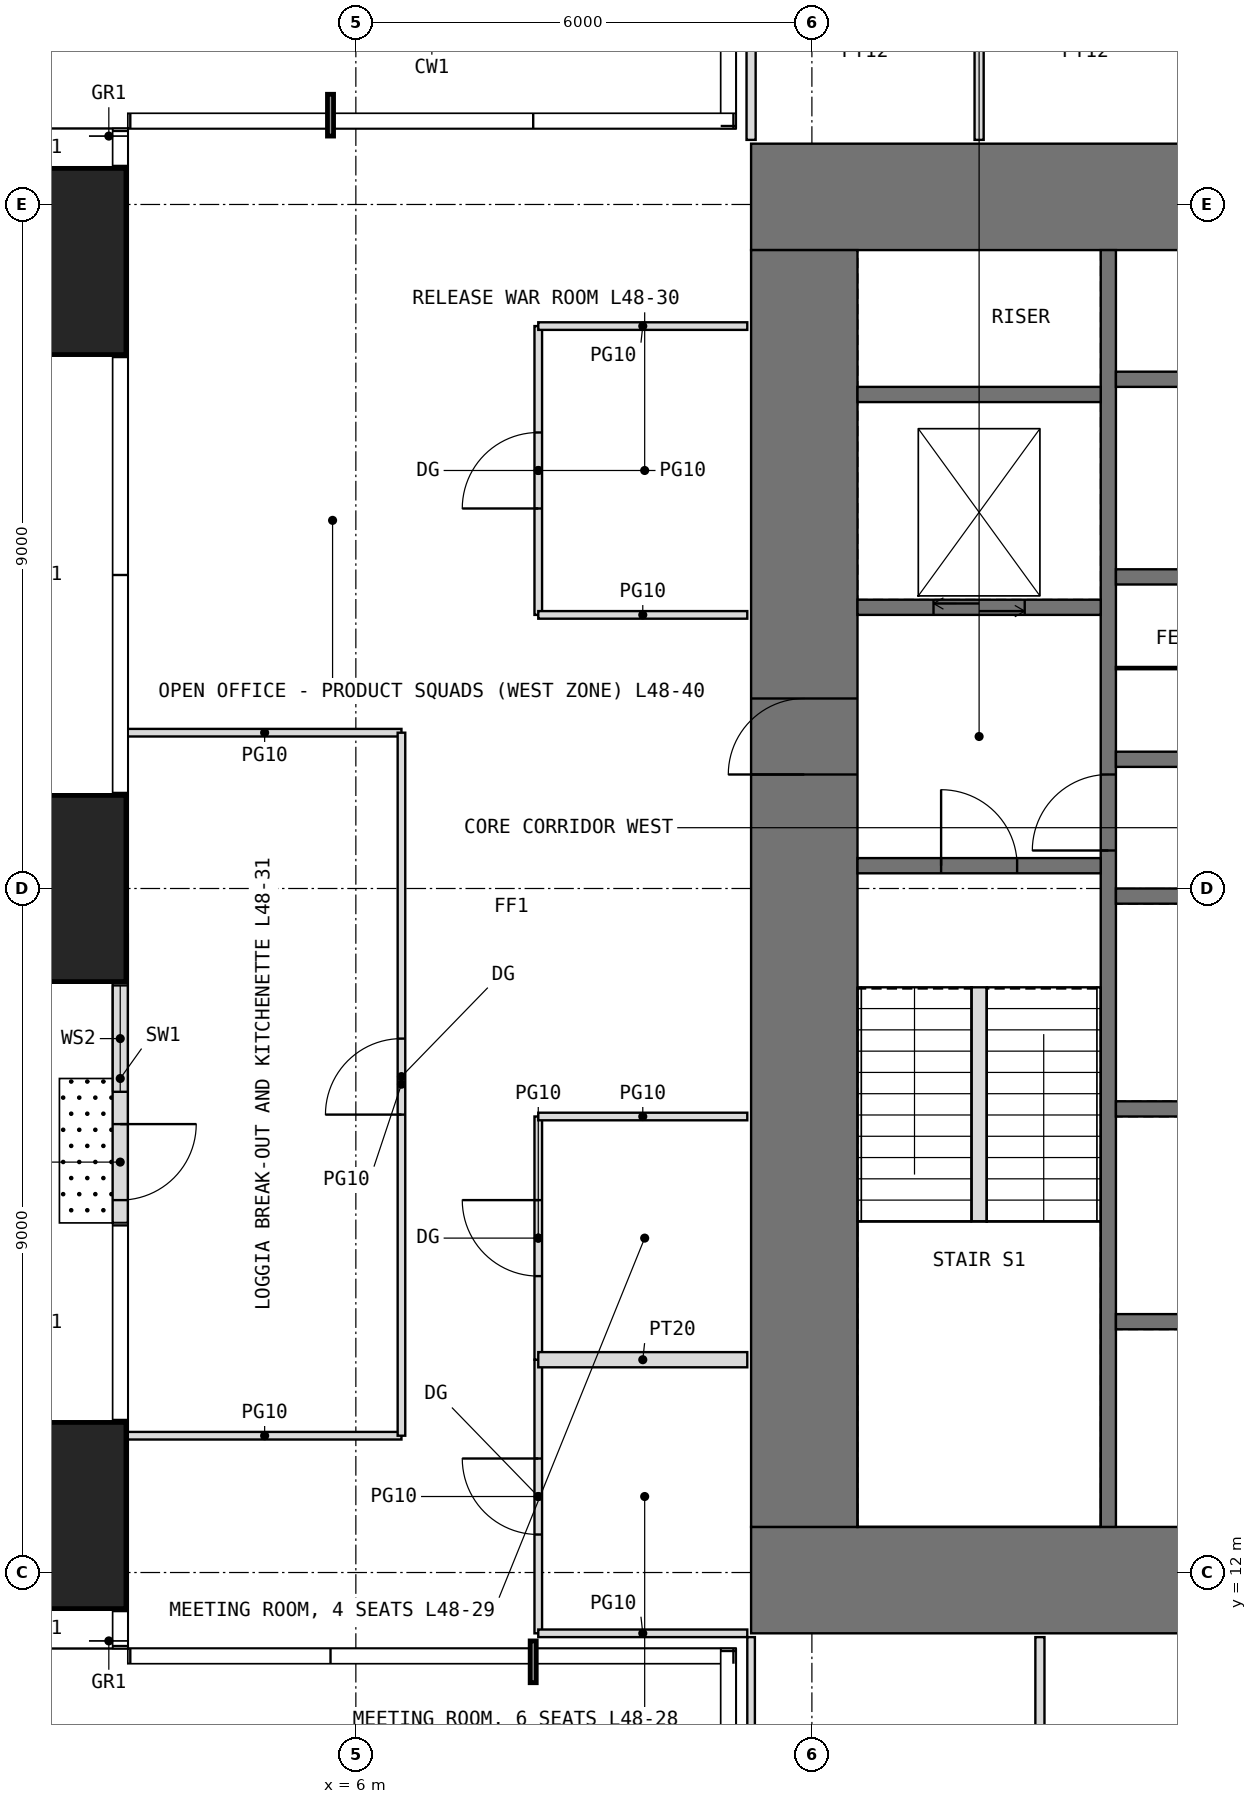
"""IFC4 building model, lengths in metres.
Left out: names, types, materials, properties, quantities, classifications, styles, units other than length and angle.
Written with IfcOpenShell. Run it as: python <this file> out.ifc"""

import sys

from ifc_helpers import new_model, si_unit, direction, frame, frame_2d, origin, origin_2d, place, context, subcontext, project, spatial, rectangle, extrude, element, fill, save


model = new_model("IFC4")
c1 = context("Model", 3, precision=1e-05, world=origin(), true_north=direction((0.0, 1.0)))
c2 = subcontext(c1, "Body", "Model", "MODEL_VIEW")
j1 = project(units=[si_unit("LENGTHUNIT", "METRE"), si_unit("PLANEANGLEUNIT", "RADIAN")], contexts=[c1])
p1 = place(None, origin())
s1 = spatial("IfcSite", under=j1, at=p1, CompositionType="ELEMENT")
p2 = place(p1, origin())
s2 = spatial("IfcBuilding", under=s1, at=p2, CompositionType="ELEMENT")
p3 = place(p2, frame((0.0, 0.0, 202.5)))
s3 = spatial("IfcBuildingStorey", under=s2, at=p3, CompositionType="ELEMENT", Elevation=202.5)
for number, where, z_axis, x_axis in (
    (1, (1.75, 12.75, 0.0), (0.0, 0.0, 1.0), (1.0, 0.0, 0.0)),
    (2, (1.75, 21.0, 0.0), (0.0, 0.0, 1.0), (1.0, 0.0, 0.0)),
    (3, (1.75, 29.25, 0.0), (0.0, 0.0, 1.0), (1.0, 0.0, 0.0)),
):
    element("IfcColumn", number, at=place(p3, frame(where, z_axis=z_axis, x_axis=x_axis)), inside=s3, PredefinedType="COLUMN", context=c2, shape_type="SweptSolid", body=[
        extrude(rectangle(XDim=2.45, YDim=2.45, at=origin_2d()), origin(), (0.0, 0.0, 1.0), 4.0),
    ])
p4 = place(p3, frame((2.9, 20.4, 0.0), z_axis=(0.0, 0.0, 1.0), x_axis=(0.0, -1.0, 0.0)))
e4 = element("IfcWall", 4, at=p4, inside=s3, PredefinedType="USERDEFINED", context=c2, shape_type="SweptSolid", body=[
    extrude(rectangle(XDim=3.8, YDim=0.2, at=frame_2d((1.9, 0.0))), origin(), (0.0, 0.0, 1.0), 3.75),
])
p5 = place(p4, frame((2.5, 0.0, 0.0)))
e5 = element("IfcOpeningElement", 5, at=p5, cuts=e4, PredefinedType="OPENING", context=c2, shape_type="SweptSolid", body=[
    extrude(rectangle(XDim=1.0, YDim=2.4, at=frame_2d((0.5, 1.2))), frame((0.0, 0.11, 0.0), z_axis=(0.0, -1.0, 0.0), x_axis=(1.0, 0.0, 0.0)), (0.0, 0.0, 1.0), 0.22),
])
p6 = place(p4, frame((0.675, 0.0, 0.3)))
e6 = element("IfcOpeningElement", 6, at=p6, cuts=e4, PredefinedType="OPENING", context=c2, shape_type="SweptSolid", body=[
    extrude(rectangle(XDim=1.4, YDim=2.7, at=frame_2d((0.7, 1.35))), frame((0.0, 0.11, 0.0), z_axis=(0.0, -1.0, 0.0), x_axis=(1.0, 0.0, 0.0)), (0.0, 0.0, 1.0), 0.22),
])
p7 = place(p3, frame((11.2, 11.9, -0.05), z_axis=(0.0, 0.0, 1.0), x_axis=(1.0, 0.0, 0.0)))
e7 = element("IfcWall", 7, at=p7, inside=s3, PredefinedType="SHEAR", context=c2, shape_type="SweptSolid", body=[
    extrude(rectangle(XDim=19.6, YDim=1.4, at=frame_2d((9.8, 0.0))), origin(), (0.0, 0.0, 1.0), 4.0),
])
p8 = place(p7, frame((8.8, 0.0, 0.05)))
e8 = element("IfcOpeningElement", 8, at=p8, cuts=e7, PredefinedType="OPENING", context=c2, shape_type="SweptSolid", body=[
    extrude(rectangle(XDim=2.0, YDim=2.2, at=frame_2d((1.0, 1.1))), frame((0.0, 0.71, 0.0), z_axis=(0.0, -1.0, 0.0), x_axis=(1.0, 0.0, 0.0)), (0.0, 0.0, 1.0), 1.42),
])
p9 = place(p3, frame((11.2, 30.1, -0.05), z_axis=(0.0, 0.0, 1.0), x_axis=(1.0, 0.0, 0.0)))
e9 = element("IfcWall", 9, at=p9, inside=s3, PredefinedType="SHEAR", context=c2, shape_type="SweptSolid", body=[
    extrude(rectangle(XDim=19.6, YDim=1.4, at=frame_2d((9.8, 0.0))), origin(), (0.0, 0.0, 1.0), 4.0),
])
p10 = place(p9, frame((8.8, 0.0, 0.05)))
e10 = element("IfcOpeningElement", 10, at=p10, cuts=e9, PredefinedType="OPENING", context=c2, shape_type="SweptSolid", body=[
    extrude(rectangle(XDim=2.0, YDim=2.2, at=frame_2d((1.0, 1.1))), frame((0.0, 0.71, 0.0), z_axis=(0.0, -1.0, 0.0), x_axis=(1.0, 0.0, 0.0)), (0.0, 0.0, 1.0), 1.42),
])
p11 = place(p3, frame((11.9, 12.6, -0.05), z_axis=(0.0, 0.0, 1.0), x_axis=(0.0, 1.0, 0.0)))
e11 = element("IfcWall", 11, at=p11, inside=s3, PredefinedType="SHEAR", context=c2, shape_type="SweptSolid", body=[
    extrude(rectangle(XDim=16.8, YDim=1.4, at=frame_2d((8.4, 0.0))), origin(), (0.0, 0.0, 1.0), 4.0),
])
p12 = place(p11, frame((9.9, 0.0, 0.05)))
e12 = element("IfcOpeningElement", 12, at=p12, cuts=e11, PredefinedType="OPENING", context=c2, shape_type="SweptSolid", body=[
    extrude(rectangle(XDim=1.0, YDim=2.2, at=frame_2d((0.5, 1.1))), frame((0.0, 0.71, 0.0), z_axis=(0.0, -1.0, 0.0), x_axis=(1.0, 0.0, 0.0)), (0.0, 0.0, 1.0), 1.42),
])
p13 = place(p3, frame((15.9, 12.6, -0.05), z_axis=(0.0, 0.0, 1.0), x_axis=(0.0, 1.0, 0.0)))
e13 = element("IfcWall", 13, at=p13, inside=s3, PredefinedType="SHEAR", context=c2, shape_type="SweptSolid", body=[
    extrude(rectangle(XDim=16.8, YDim=0.2, at=frame_2d((8.4, 0.0))), origin(), (0.0, 0.0, 1.0), 4.0),
])
p14 = place(p13, frame((8.9, 0.0, 0.05)))
e14 = element("IfcOpeningElement", 14, at=p14, cuts=e13, PredefinedType="OPENING", context=c2, shape_type="SweptSolid", body=[
    extrude(rectangle(XDim=1.0, YDim=2.2, at=frame_2d((0.5, 1.1))), frame((0.0, 0.11, 0.0), z_axis=(0.0, -1.0, 0.0), x_axis=(1.0, 0.0, 0.0)), (0.0, 0.0, 1.0), 0.22),
])
p15 = place(p3, frame((12.6, 21.3, -0.05), z_axis=(0.0, 0.0, 1.0), x_axis=(1.0, 0.0, 0.0)))
e15 = element("IfcWall", 15, at=p15, inside=s3, PredefinedType="SHEAR", context=c2, shape_type="SweptSolid", body=[
    extrude(rectangle(XDim=3.2, YDim=0.2, at=frame_2d((1.6, 0.0))), origin(), (0.0, 0.0, 1.0), 4.0),
])
p16 = place(p15, frame((1.1, 0.0, 0.05)))
e16 = element("IfcOpeningElement", 16, at=p16, cuts=e15, PredefinedType="OPENING", context=c2, shape_type="SweptSolid", body=[
    extrude(rectangle(XDim=1.0, YDim=2.2, at=frame_2d((0.5, 1.1))), frame((0.0, 0.11, 0.0), z_axis=(0.0, -1.0, 0.0), x_axis=(1.0, 0.0, 0.0)), (0.0, 0.0, 1.0), 0.22),
])
p17 = place(p3, frame((12.6, 24.7, -0.05), z_axis=(0.0, 0.0, 1.0), x_axis=(1.0, 0.0, 0.0)))
e17 = element("IfcWall", 17, at=p17, inside=s3, PredefinedType="SHEAR", context=c2, shape_type="SweptSolid", body=[
    extrude(rectangle(XDim=3.2, YDim=0.2, at=frame_2d((1.6, 0.0))), origin(), (0.0, 0.0, 1.0), 4.0),
])
p18 = place(p17, frame((1.0, 0.0, 0.05)))
e18 = element("IfcOpeningElement", 18, at=p18, cuts=e17, PredefinedType="OPENING", context=c2, shape_type="SweptSolid", body=[
    extrude(rectangle(XDim=1.2, YDim=2.2, at=frame_2d((0.6, 1.1))), frame((0.0, 0.11, 0.0), z_axis=(0.0, -1.0, 0.0), x_axis=(1.0, 0.0, 0.0)), (0.0, 0.0, 1.0), 0.22),
])
for number, where, z_axis, x_axis in (
    (19, (12.6, 27.5, -0.05), (0.0, 0.0, 1.0), (1.0, 0.0, 0.0)),
    (20, (16.0, 15.3, -0.05), (0.0, 0.0, 1.0), (1.0, 0.0, 0.0)),
    (21, (16.0, 18.1, -0.05), (0.0, 0.0, 1.0), (1.0, 0.0, 0.0)),
    (22, (16.0, 20.9, -0.05), (0.0, 0.0, 1.0), (1.0, 0.0, 0.0)),
    (23, (16.0, 22.7, -0.05), (0.0, 0.0, 1.0), (1.0, 0.0, 0.0)),
    (24, (16.0, 25.1, -0.05), (0.0, 0.0, 1.0), (1.0, 0.0, 0.0)),
    (25, (16.0, 27.7, -0.05), (0.0, 0.0, 1.0), (1.0, 0.0, 0.0)),
):
    element("IfcWall", number, at=place(p3, frame(where, z_axis=z_axis, x_axis=x_axis)), inside=s3, PredefinedType="SHEAR", context=c2, shape_type="SweptSolid", body=[
        extrude(rectangle(XDim=3.2, YDim=0.2, at=frame_2d((1.6, 0.0))), origin(), (0.0, 0.0, 1.0), 4.0),
    ])
p19 = place(p3, frame((16.0, 23.9, 0.0), z_axis=(0.0, 0.0, 1.0), x_axis=(1.0, 0.0, 0.0)))
e26 = element("IfcWall", 26, at=p19, inside=s3, PredefinedType="PARTITIONING", context=c2, shape_type="SweptSolid", body=[
    extrude(rectangle(XDim=1.4, YDim=0.03, at=frame_2d((0.7, 0.0))), origin(), (0.0, 0.0, 1.0), 3.75),
])
for number, where, z_axis, x_axis in (
    (27, (3.0, 13.8, 0.0), (0.0, 0.0, 1.0), (1.0, 0.0, 0.0)),
    (28, (3.0, 23.05, 0.0), (0.0, 0.0, 1.0), (1.0, 0.0, 0.0)),
):
    element("IfcWall", number, at=place(p3, frame(where, z_axis=z_axis, x_axis=x_axis)), inside=s3, PredefinedType="PARTITIONING", context=c2, shape_type="SweptSolid", body=[
        extrude(rectangle(XDim=3.6, YDim=0.1, at=frame_2d((1.8, 0.0))), origin(), (0.0, 0.0, 1.0), 3.75),
    ])
p20 = place(p3, frame((6.6, 13.8, 0.0), z_axis=(0.0, 0.0, 1.0), x_axis=(0.0, 1.0, 0.0)))
e29 = element("IfcWall", 29, at=p20, inside=s3, PredefinedType="PARTITIONING", context=c2, shape_type="SweptSolid", body=[
    extrude(rectangle(XDim=9.25, YDim=0.1, at=frame_2d((4.625, 0.0))), origin(), (0.0, 0.0, 1.0), 3.75),
])
p21 = place(p20, frame((4.225, 0.0, 0.0)))
e30 = element("IfcOpeningElement", 30, at=p21, cuts=e29, PredefinedType="OPENING", context=c2, shape_type="SweptSolid", body=[
    extrude(rectangle(XDim=1.0, YDim=2.4, at=frame_2d((0.5, 1.2))), frame((0.0, 0.06, 0.0), z_axis=(0.0, -1.0, 0.0), x_axis=(1.0, 0.0, 0.0)), (0.0, 0.0, 1.0), 0.12),
])
p22 = place(p3, frame((8.4, 11.2, 0.0), z_axis=(0.0, 0.0, 1.0), x_axis=(0.0, 1.0, 0.0)))
e31 = element("IfcWall", 31, at=p22, inside=s3, PredefinedType="PARTITIONING", context=c2, shape_type="SweptSolid", body=[
    extrude(rectangle(XDim=3.6, YDim=0.1, at=frame_2d((1.8, 0.0))), origin(), (0.0, 0.0, 1.0), 3.75),
])
p23 = place(p22, frame((1.3, 0.0, 0.0)))
e32 = element("IfcOpeningElement", 32, at=p23, cuts=e31, PredefinedType="OPENING", context=c2, shape_type="SweptSolid", body=[
    extrude(rectangle(XDim=1.0, YDim=2.4, at=frame_2d((0.5, 1.2))), frame((0.0, 0.06, 0.0), z_axis=(0.0, -1.0, 0.0), x_axis=(1.0, 0.0, 0.0)), (0.0, 0.0, 1.0), 0.12),
])
p24 = place(p3, frame((8.4, 11.2, 0.0), z_axis=(0.0, 0.0, 1.0), x_axis=(1.0, 0.0, 0.0)))
e33 = element("IfcWall", 33, at=p24, inside=s3, PredefinedType="PARTITIONING", context=c2, shape_type="SweptSolid", body=[
    extrude(rectangle(XDim=2.75, YDim=0.1, at=frame_2d((1.375, 0.0))), origin(), (0.0, 0.0, 1.0), 3.75),
])
p25 = place(p3, frame((8.4, 14.8, 0.0), z_axis=(0.0, 0.0, 1.0), x_axis=(0.0, 1.0, 0.0)))
e34 = element("IfcWall", 34, at=p25, inside=s3, PredefinedType="PARTITIONING", context=c2, shape_type="SweptSolid", body=[
    extrude(rectangle(XDim=3.2, YDim=0.1, at=frame_2d((1.6, 0.0))), origin(), (0.0, 0.0, 1.0), 3.75),
])
p26 = place(p25, frame((1.1, 0.0, 0.0)))
e35 = element("IfcOpeningElement", 35, at=p26, cuts=e34, PredefinedType="OPENING", context=c2, shape_type="SweptSolid", body=[
    extrude(rectangle(XDim=1.0, YDim=2.4, at=frame_2d((0.5, 1.2))), frame((0.0, 0.06, 0.0), z_axis=(0.0, -1.0, 0.0), x_axis=(1.0, 0.0, 0.0)), (0.0, 0.0, 1.0), 0.12),
])
p27 = place(p3, frame((8.4, 14.8, 0.0), z_axis=(0.0, 0.0, 1.0), x_axis=(1.0, 0.0, 0.0)))
e36 = element("IfcWall", 36, at=p27, inside=s3, PredefinedType="PARTITIONING", context=c2, shape_type="SweptSolid", body=[
    extrude(rectangle(XDim=2.75, YDim=0.2, at=frame_2d((1.375, 0.0))), origin(), (0.0, 0.0, 1.0), 3.75),
])
p28 = place(p3, frame((8.4, 18.0, 0.0), z_axis=(0.0, 0.0, 1.0), x_axis=(1.0, 0.0, 0.0)))
e37 = element("IfcWall", 37, at=p28, inside=s3, PredefinedType="PARTITIONING", context=c2, shape_type="SweptSolid", body=[
    extrude(rectangle(XDim=2.75, YDim=0.1, at=frame_2d((1.375, 0.0))), origin(), (0.0, 0.0, 1.0), 3.75),
])
p29 = place(p3, frame((8.4, 24.6, 0.0), z_axis=(0.0, 0.0, 1.0), x_axis=(0.0, 1.0, 0.0)))
e38 = element("IfcWall", 38, at=p29, inside=s3, PredefinedType="PARTITIONING", context=c2, shape_type="SweptSolid", body=[
    extrude(rectangle(XDim=3.8, YDim=0.1, at=frame_2d((1.9, 0.0))), origin(), (0.0, 0.0, 1.0), 3.75),
])
p30 = place(p29, frame((1.4, 0.0, 0.0)))
e39 = element("IfcOpeningElement", 39, at=p30, cuts=e38, PredefinedType="OPENING", context=c2, shape_type="SweptSolid", body=[
    extrude(rectangle(XDim=1.0, YDim=2.4, at=frame_2d((0.5, 1.2))), frame((0.0, 0.06, 0.0), z_axis=(0.0, -1.0, 0.0), x_axis=(1.0, 0.0, 0.0)), (0.0, 0.0, 1.0), 0.12),
])
for number, where, z_axis, x_axis in (
    (40, (8.4, 24.6, 0.0), (0.0, 0.0, 1.0), (1.0, 0.0, 0.0)),
    (41, (8.4, 28.4, 0.0), (0.0, 0.0, 1.0), (1.0, 0.0, 0.0)),
):
    element("IfcWall", number, at=place(p3, frame(where, z_axis=z_axis, x_axis=x_axis)), inside=s3, PredefinedType="PARTITIONING", context=c2, shape_type="SweptSolid", body=[
        extrude(rectangle(XDim=2.75, YDim=0.1, at=frame_2d((1.375, 0.0))), origin(), (0.0, 0.0, 1.0), 3.75),
    ])
p31 = place(p3, frame((11.2, 6.8, 0.0), z_axis=(0.0, 0.0, 1.0), x_axis=(0.0, 1.0, 0.0)))
e42 = element("IfcWall", 42, at=p31, inside=s3, PredefinedType="PARTITIONING", context=c2, shape_type="SweptSolid", body=[
    extrude(rectangle(XDim=4.35, YDim=0.1, at=frame_2d((2.175, 0.0))), origin(), (0.0, 0.0, 1.0), 3.75),
])
for number, where, z_axis, x_axis in (
    (43, (11.2, 30.85, 0.0), (0.0, 0.0, 1.0), (0.0, 1.0, 0.0)),
    (44, (14.2, 30.85, 0.0), (0.0, 0.0, 1.0), (0.0, 1.0, 0.0)),
):
    element("IfcWall", number, at=place(p3, frame(where, z_axis=z_axis, x_axis=x_axis)), inside=s3, PredefinedType="PARTITIONING", context=c2, shape_type="SweptSolid", body=[
        extrude(rectangle(XDim=3.05, YDim=0.12, at=frame_2d((1.525, 0.0))), origin(), (0.0, 0.0, 1.0), 3.75),
    ])
p32 = place(p3, frame((15.0, 6.8, 0.0), z_axis=(0.0, 0.0, 1.0), x_axis=(0.0, 1.0, 0.0)))
e45 = element("IfcWall", 45, at=p32, inside=s3, PredefinedType="PARTITIONING", context=c2, shape_type="SweptSolid", body=[
    extrude(rectangle(XDim=4.35, YDim=0.12, at=frame_2d((2.175, 0.0))), origin(), (0.0, 0.0, 1.0), 3.75),
])
p33 = place(p3, frame((14.2, 16.62, 0.0), z_axis=(0.0, 0.0, 1.0), x_axis=(0.0, 1.0, 0.0)))
e46 = element("IfcWall", 46, at=p33, inside=s3, PredefinedType="PARTITIONING", context=c2, shape_type="SweptSolid", body=[
    extrude(rectangle(XDim=3.08, YDim=0.2, at=frame_2d((1.54, 0.0))), origin(), (0.0, 0.0, 1.0), 4.0),
])
p34 = place(p5, origin())
e47 = element("IfcDoor", 47, at=p34, inside=s3, OperationType="SINGLE_SWING_LEFT", PredefinedType="DOOR", context=c2, shape_type="SweptSolid", body=[
    extrude(rectangle(XDim=1.0, YDim=2.4, at=frame_2d((0.5, 1.2))), frame((0.0, 0.025, 0.0), z_axis=(0.0, -1.0, 0.0), x_axis=(1.0, 0.0, 0.0)), (0.0, 0.0, 1.0), 0.05),
])
fill(e5, e47)
p35 = place(p6, origin())
e48 = element("IfcWindow", 48, at=p35, inside=s3, PartitioningType="SINGLE_PANEL", PredefinedType="WINDOW", context=c2, shape_type="SweptSolid", body=[
    extrude(rectangle(XDim=1.4, YDim=2.7, at=frame_2d((0.7, 1.35))), frame((0.0, 0.03, 0.0), z_axis=(0.0, -1.0, 0.0), x_axis=(1.0, 0.0, 0.0)), (0.0, 0.0, 1.0), 0.06),
])
fill(e6, e48)
p36 = place(p12, origin())
e49 = element("IfcDoor", 49, at=p36, inside=s3, OperationType="SINGLE_SWING_LEFT", PredefinedType="DOOR", context=c2, shape_type="SweptSolid", body=[
    extrude(rectangle(XDim=1.0, YDim=2.2, at=frame_2d((0.5, 1.1))), frame((0.0, 0.025, 0.0), z_axis=(0.0, -1.0, 0.0), x_axis=(1.0, 0.0, 0.0)), (0.0, 0.0, 1.0), 0.05),
])
fill(e12, e49)
p37 = place(p16, origin())
e50 = element("IfcDoor", 50, at=p37, inside=s3, OperationType="SINGLE_SWING_LEFT", PredefinedType="DOOR", context=c2, shape_type="SweptSolid", body=[
    extrude(rectangle(XDim=1.0, YDim=2.2, at=frame_2d((0.5, 1.1))), frame((0.0, 0.025, 0.0), z_axis=(0.0, -1.0, 0.0), x_axis=(1.0, 0.0, 0.0)), (0.0, 0.0, 1.0), 0.05),
])
fill(e16, e50)
p38 = place(p14, origin())
e51 = element("IfcDoor", 51, at=p38, inside=s3, OperationType="SINGLE_SWING_LEFT", PredefinedType="DOOR", context=c2, shape_type="SweptSolid", body=[
    extrude(rectangle(XDim=1.0, YDim=2.2, at=frame_2d((0.5, 1.1))), frame((0.0, 0.025, 0.0), z_axis=(0.0, -1.0, 0.0), x_axis=(1.0, 0.0, 0.0)), (0.0, 0.0, 1.0), 0.05),
])
fill(e14, e51)
p39 = place(p23, origin())
e52 = element("IfcDoor", 52, at=p39, inside=s3, OperationType="SINGLE_SWING_RIGHT", PredefinedType="DOOR", context=c2, shape_type="SweptSolid", body=[
    extrude(rectangle(XDim=1.0, YDim=2.4, at=frame_2d((0.5, 1.2))), frame((0.0, 0.025, 0.0), z_axis=(0.0, -1.0, 0.0), x_axis=(1.0, 0.0, 0.0)), (0.0, 0.0, 1.0), 0.05),
])
fill(e32, e52)
p40 = place(p26, origin())
e53 = element("IfcDoor", 53, at=p40, inside=s3, OperationType="SINGLE_SWING_RIGHT", PredefinedType="DOOR", context=c2, shape_type="SweptSolid", body=[
    extrude(rectangle(XDim=1.0, YDim=2.4, at=frame_2d((0.5, 1.2))), frame((0.0, 0.025, 0.0), z_axis=(0.0, -1.0, 0.0), x_axis=(1.0, 0.0, 0.0)), (0.0, 0.0, 1.0), 0.05),
])
fill(e35, e53)
p41 = place(p30, origin())
e54 = element("IfcDoor", 54, at=p41, inside=s3, OperationType="SINGLE_SWING_LEFT", PredefinedType="DOOR", context=c2, shape_type="SweptSolid", body=[
    extrude(rectangle(XDim=1.0, YDim=2.4, at=frame_2d((0.5, 1.2))), frame((0.0, 0.025, 0.0), z_axis=(0.0, -1.0, 0.0), x_axis=(1.0, 0.0, 0.0)), (0.0, 0.0, 1.0), 0.05),
])
fill(e39, e54)
p42 = place(p21, origin())
e55 = element("IfcDoor", 55, at=p42, inside=s3, OperationType="SINGLE_SWING_LEFT", PredefinedType="DOOR", context=c2, shape_type="SweptSolid", body=[
    extrude(rectangle(XDim=1.0, YDim=2.4, at=frame_2d((0.5, 1.2))), frame((0.0, 0.025, 0.0), z_axis=(0.0, -1.0, 0.0), x_axis=(1.0, 0.0, 0.0)), (0.0, 0.0, 1.0), 0.05),
])
fill(e30, e55)
p43 = place(p18, origin())
e56 = element("IfcDoor", 56, at=p43, inside=s3, OperationType="DOUBLE_DOOR_SLIDING", PredefinedType="DOOR", context=c2, shape_type="SweptSolid", body=[
    extrude(rectangle(XDim=1.2, YDim=2.2, at=frame_2d((0.6, 1.1))), frame((0.0, 0.025, 0.0), z_axis=(0.0, -1.0, 0.0), x_axis=(1.0, 0.0, 0.0)), (0.0, 0.0, 1.0), 0.05),
])
fill(e18, e56)
save(model, sys.argv[1])
